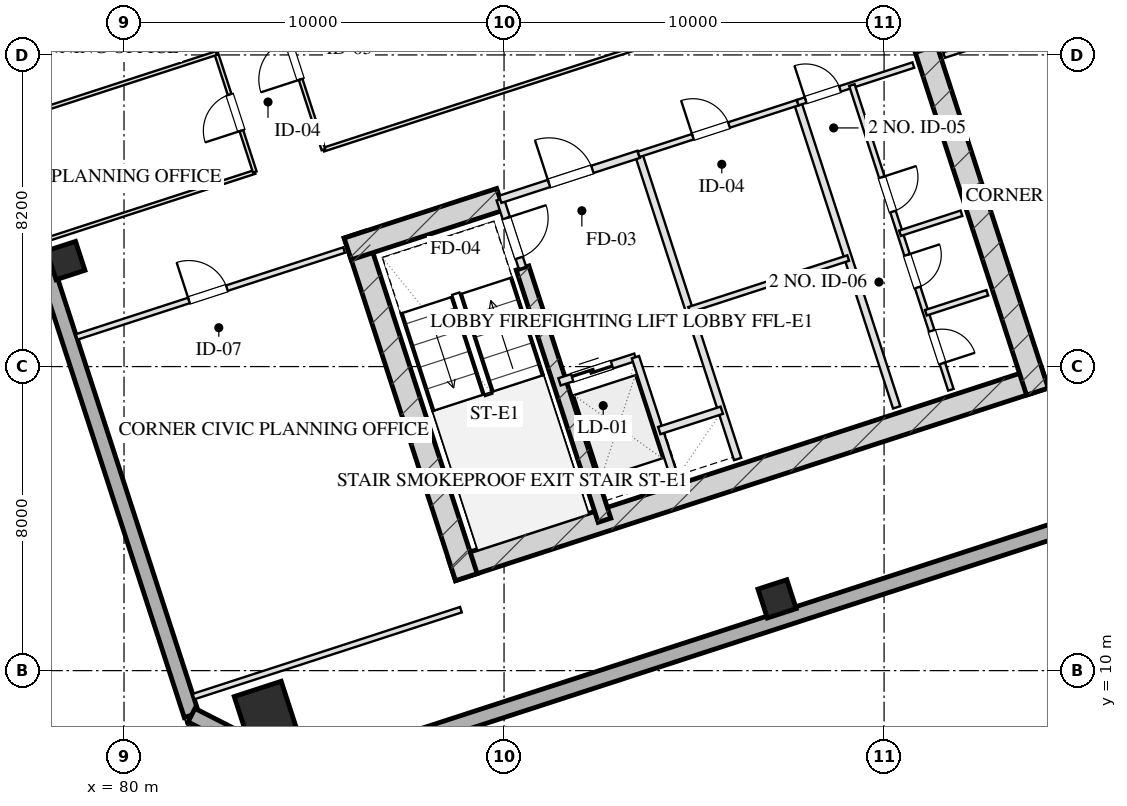
"""IFC4 building model, lengths in metres.
Left out: names, types, materials, properties, quantities, classifications, styles, units other than length and angle.
Written with IfcOpenShell. Run it as: python <this file> out.ifc"""

import sys

from ifc_helpers import new_model, si_unit, direction, frame, frame_2d, origin, origin_2d, place, context, subcontext, project, spatial, rectangle, hollow_rectangle, extrude, element, fill, save


model = new_model("IFC4")
c1 = context("Model", 3, precision=1e-05, world=origin(), true_north=direction((0.0, 1.0)))
c2 = subcontext(c1, "Body", "Model", "MODEL_VIEW")
j1 = project(units=[si_unit("LENGTHUNIT", "METRE"), si_unit("PLANEANGLEUNIT", "RADIAN")], contexts=[c1])
p1 = place(None, origin())
s1 = spatial("IfcSite", under=j1, at=p1, CompositionType="ELEMENT")
p2 = place(p1, origin())
s2 = spatial("IfcBuilding", under=s1, at=p2, CompositionType="ELEMENT")
p3 = place(p2, frame((0.0, 0.0, 149.5)))
s3 = spatial("IfcBuildingStorey", under=s2, at=p3, CompositionType="ELEMENT", Elevation=149.5)
p4 = place(p3, frame((88.63, 12.652, 0.0), z_axis=(0.0, 0.0, 1.0), x_axis=(0.95105714907, 0.309015046886, 0.0)))
e1 = element("IfcWall", 1, at=p4, inside=s3, PredefinedType="SHEAR", context=c2, shape_type="SweptSolid", body=[
    extrude(rectangle(XDim=16.4, YDim=0.6, at=frame_2d((8.2, 0.0))), origin(), (0.0, 0.0, 1.0), 3.45),
])
p5 = place(p3, frame((86.078, 21.475, 0.0), z_axis=(0.0, 0.0, 1.0), x_axis=(0.309017938678, -0.951056209472, 0.0)))
e2 = element("IfcWall", 2, at=p5, inside=s3, PredefinedType="SHEAR", context=c2, shape_type="SweptSolid", body=[
    extrude(rectangle(XDim=9.48, YDim=0.6, at=frame_2d((4.74, 0.0))), origin(), (0.0, 0.0, 1.0), 3.45),
])
p6 = place(p3, frame((101.105, 26.358, 0.0), z_axis=(0.0, 0.0, 1.0), x_axis=(0.309010370028, -0.95105866865, 0.0)))
e3 = element("IfcWall", 3, at=p6, inside=s3, PredefinedType="SHEAR", context=c2, shape_type="SweptSolid", body=[
    extrude(rectangle(XDim=9.48, YDim=0.6, at=frame_2d((4.74, 0.0))), origin(), (0.0, 0.0, 1.0), 3.45),
])
p7 = place(p3, frame((90.486, 20.594, 0.0), z_axis=(0.0, 0.0, 1.0), x_axis=(0.309020428229, -0.951055400562, 0.0)))
e4 = element("IfcWall", 4, at=p7, inside=s3, PredefinedType="SHEAR", context=c2, shape_type="SweptSolid", body=[
    extrude(rectangle(XDim=6.98, YDim=0.35, at=frame_2d((3.49, 0.0))), origin(), (0.0, 0.0, 1.0), 3.45),
])
p8 = place(p3, frame((85.886, 21.097, 0.0), z_axis=(0.0, 0.0, 1.0), x_axis=(0.951068073652, 0.308981422225, 0.0)))
e5 = element("IfcWall", 5, at=p8, inside=s3, PredefinedType="SHEAR", context=c2, shape_type="SweptSolid", body=[
    extrude(rectangle(XDim=4.22, YDim=0.6, at=frame_2d((2.11, 0.0))), origin(), (0.0, 0.0, 1.0), 3.45),
])
p9 = place(p3, frame((83.719, 8.901, 0.0), z_axis=(0.0, 0.0, 1.0), x_axis=(0.951056516295, 0.309016994375, 0.0)))
e6 = element("IfcColumn", 6, at=p9, inside=s3, PredefinedType="COLUMN", context=c2, shape_type="SweptSolid", body=[
    extrude(hollow_rectangle(XDim=1.3, YDim=1.3, WallThickness=0.045, at=origin_2d()), origin(), (0.0, 0.0, 1.0), 3.451),
])
for number, where, z_axis, x_axis in (
    (7, (78.468, 20.79, 0.0), (0.0, 0.0, 1.0), (0.951, 0.309, 0.0)),
    (8, (97.185, 11.888, 0.0), (0.0, 0.0, 1.0), (0.951, 0.309, 0.0)),
):
    element("IfcColumn", number, at=place(p3, frame(where, z_axis=z_axis, x_axis=x_axis)), inside=s3, PredefinedType="COLUMN", context=c2, shape_type="SweptSolid", body=[
        extrude(hollow_rectangle(XDim=0.8, YDim=0.8, WallThickness=0.028, at=origin_2d()), origin(), (0.0, 0.0, 1.0), 3.451),
    ])
p10 = place(p3, frame((81.776, 8.827, 0.0), z_axis=(0.0, 0.0, 1.0), x_axis=(-0.309014228706, 0.951057414911, 0.0)))
e9 = element("IfcWall", 9, at=p10, inside=s3, PredefinedType="SOLIDWALL", context=c2, shape_type="SweptSolid", body=[
    extrude(rectangle(XDim=42.8, YDim=0.4, at=frame_2d((21.4, 0.0))), origin(), (0.0, 0.0, 1.0), 2.61),
])
p11 = place(p3, frame((98.224, 59.173, 0.0), z_axis=(0.0, 0.0, 1.0), x_axis=(0.309014228706, -0.951057414911, 0.0)))
e10 = element("IfcWall", 10, at=p11, inside=s3, PredefinedType="SOLIDWALL", context=c2, shape_type="SweptSolid", body=[
    extrude(rectangle(XDim=42.8, YDim=0.4, at=frame_2d((21.4, 0.0))), origin(), (0.0, 0.0, 1.0), 2.61),
])
p12 = place(p11, frame((26.675, 0.0, 0.75)))
e11 = element("IfcOpeningElement", 11, at=p12, cuts=e10, PredefinedType="OPENING", context=c2, shape_type="SweptSolid", body=[
    extrude(rectangle(XDim=2.25, YDim=1.46, at=frame_2d((1.125, 0.73))), frame((0.0, 0.21, 0.0), z_axis=(0.0, -1.0, 0.0), x_axis=(1.0, 0.0, 0.0)), (0.0, 0.0, 1.0), 0.42),
])
p13 = place(p11, frame((13.875, 0.0, 0.75)))
e12 = element("IfcOpeningElement", 12, at=p13, cuts=e10, PredefinedType="OPENING", context=c2, shape_type="SweptSolid", body=[
    extrude(rectangle(XDim=2.25, YDim=1.46, at=frame_2d((1.125, 0.73))), frame((0.0, 0.21, 0.0), z_axis=(0.0, -1.0, 0.0), x_axis=(1.0, 0.0, 0.0)), (0.0, 0.0, 1.0), 0.42),
])
p14 = place(p3, frame((109.908, 15.444, 0.0), z_axis=(0.0, 0.0, 1.0), x_axis=(-0.951057580055, -0.30901372044, 0.0)))
e13 = element("IfcWall", 13, at=p14, inside=s3, PredefinedType="SOLIDWALL", context=c2, shape_type="SweptSolid", body=[
    extrude(rectangle(XDim=26.4, YDim=0.4, at=frame_2d((13.2, 0.0))), origin(), (0.0, 0.0, 1.0), 2.61),
])
p15 = place(p3, frame((84.801, 7.286, 0.0), z_axis=(0.0, 0.0, 1.0), x_axis=(-0.891020832027, 0.453962417932, 0.0)))
e14 = element("IfcWall", 14, at=p15, inside=s3, PredefinedType="SOLIDWALL", context=c2, shape_type="SweptSolid", body=[
    extrude(rectangle(XDim=3.394, YDim=0.4, at=frame_2d((1.697, 0.0))), origin(), (0.0, 0.0, 1.0), 2.61),
])
p16 = place(p3, frame((89.899, 22.401, 0.0), z_axis=(0.0, 0.0, 1.0), x_axis=(0.308932062672, -0.951084108086, 0.0)))
e15 = element("IfcWall", 15, at=p16, inside=s3, PredefinedType="PARTITIONING", context=c2, shape_type="SweptSolid", body=[
    extrude(rectangle(XDim=1.9, YDim=0.2, at=frame_2d((0.95, 0.0))), origin(), (0.0, 0.0, 1.0), 3.175),
])
p17 = place(p16, frame((0.52, 0.0, 0.0)))
e16 = element("IfcOpeningElement", 16, at=p17, cuts=e15, PredefinedType="OPENING", context=c2, shape_type="SweptSolid", body=[
    extrude(rectangle(XDim=1.1, YDim=2.05, at=frame_2d((0.55, 1.025))), frame((0.0, 0.11, 0.0), z_axis=(0.0, -1.0, 0.0), x_axis=(1.0, 0.0, 0.0)), (0.0, 0.0, 1.0), 0.22),
])
p18 = place(p3, frame((93.542, 23.585, 0.0), z_axis=(0.0, 0.0, 1.0), x_axis=(0.309042196757, -0.951048327176, 0.0)))
e17 = element("IfcWall", 17, at=p18, inside=s3, PredefinedType="PARTITIONING", context=c2, shape_type="SweptSolid", body=[
    extrude(rectangle(XDim=8.43, YDim=0.2, at=frame_2d((4.215, 0.0))), origin(), (0.0, 0.0, 1.0), 3.175),
])
p19 = place(p3, frame((89.899, 22.401, 0.0), z_axis=(0.0, 0.0, 1.0), x_axis=(0.951046716504, 0.309047153403, 0.0)))
e18 = element("IfcWall", 18, at=p19, inside=s3, PredefinedType="PARTITIONING", context=c2, shape_type="SweptSolid", body=[
    extrude(rectangle(XDim=3.83, YDim=0.2, at=frame_2d((1.915, 0.0))), origin(), (0.0, 0.0, 1.0), 3.175),
])
p20 = place(p19, frame((1.35, 0.0, 0.0)))
e19 = element("IfcOpeningElement", 19, at=p20, cuts=e18, PredefinedType="OPENING", context=c2, shape_type="SweptSolid", body=[
    extrude(rectangle(XDim=1.2, YDim=2.05, at=frame_2d((0.6, 1.025))), frame((0.0, 0.11, 0.0), z_axis=(0.0, -1.0, 0.0), x_axis=(1.0, 0.0, 0.0)), (0.0, 0.0, 1.0), 0.22),
])
p21 = place(p3, frame((91.46, 17.598, 0.0), z_axis=(0.0, 0.0, 1.0), x_axis=(0.951062257173, 0.308999325213, 0.0)))
e20 = element("IfcWall", 20, at=p21, inside=s3, PredefinedType="PARTITIONING", context=c2, shape_type="SweptSolid", body=[
    extrude(rectangle(XDim=2.1, YDim=0.2, at=frame_2d((1.05, 0.0))), origin(), (0.0, 0.0, 1.0), 3.175),
])
p22 = place(p21, frame((0.35, 0.0, 0.0)))
e21 = element("IfcOpeningElement", 21, at=p22, cuts=e20, PredefinedType="OPENING", context=c2, shape_type="SweptSolid", body=[
    extrude(rectangle(XDim=1.1, YDim=2.05, at=frame_2d((0.55, 1.025))), frame((0.0, 0.11, 0.0), z_axis=(0.0, -1.0, 0.0), x_axis=(1.0, 0.0, 0.0)), (0.0, 0.0, 1.0), 0.22),
])
p23 = place(p3, frame((93.457, 18.247, 0.0), z_axis=(0.0, 0.0, 1.0), x_axis=(0.3089935693, -0.951064127245, 0.0)))
e22 = element("IfcWall", 22, at=p23, inside=s3, PredefinedType="PARTITIONING", context=c2, shape_type="SweptSolid", body=[
    extrude(rectangle(XDim=3.7, YDim=0.2, at=frame_2d((1.85, 0.0))), origin(), (0.0, 0.0, 1.0), 3.175),
])
p24 = place(p3, frame((94.084, 16.317, 0.0), z_axis=(0.0, 0.0, 1.0), x_axis=(0.951041328149, 0.309063734775, 0.0)))
e23 = element("IfcWall", 23, at=p24, inside=s3, PredefinedType="PARTITIONING", context=c2, shape_type="SweptSolid", body=[
    extrude(rectangle(XDim=1.73, YDim=0.2, at=frame_2d((0.865, 0.0))), origin(), (0.0, 0.0, 1.0), 3.175),
])
p25 = place(p3, frame((97.727, 24.944, 0.0), z_axis=(0.0, 0.0, 1.0), x_axis=(0.309016001439, -0.951056838919, 0.0)))
e24 = element("IfcWall", 24, at=p25, inside=s3, PredefinedType="PARTITIONING", context=c2, shape_type="SweptSolid", body=[
    extrude(rectangle(XDim=8.43, YDim=0.2, at=frame_2d((4.215, 0.0))), origin(), (0.0, 0.0, 1.0), 3.175),
])
p26 = place(p3, frame((93.542, 23.585, 0.0), z_axis=(0.0, 0.0, 1.0), x_axis=(0.951063829732, 0.308994485023, 0.0)))
e25 = element("IfcWall", 25, at=p26, inside=s3, PredefinedType="PARTITIONING", context=c2, shape_type="SweptSolid", body=[
    extrude(rectangle(XDim=4.4, YDim=0.15, at=frame_2d((2.2, 0.0))), origin(), (0.0, 0.0, 1.0), 3.175),
])
p27 = place(p26, frame((1.5, 0.0, 0.0)))
e26 = element("IfcOpeningElement", 26, at=p27, cuts=e25, PredefinedType="OPENING", context=c2, shape_type="SweptSolid", body=[
    extrude(rectangle(XDim=1.0, YDim=2.05, at=frame_2d((0.5, 1.025))), frame((0.0, 0.085, 0.0), z_axis=(0.0, -1.0, 0.0), x_axis=(1.0, 0.0, 0.0)), (0.0, 0.0, 1.0), 0.17),
])
p28 = place(p3, frame((94.871, 19.495, 0.0), z_axis=(0.0, 0.0, 1.0), x_axis=(0.951042223598, 0.309060979314, 0.0)))
e27 = element("IfcWall", 27, at=p28, inside=s3, PredefinedType="PARTITIONING", context=c2, shape_type="SweptSolid", body=[
    extrude(rectangle(XDim=4.4, YDim=0.15, at=frame_2d((2.2, 0.0))), origin(), (0.0, 0.0, 1.0), 3.175),
])
p29 = place(p3, frame((97.727, 24.944, 0.0), z_axis=(0.0, 0.0, 1.0), x_axis=(0.951036872128, 0.309077446369, 0.0)))
e28 = element("IfcWall", 28, at=p29, inside=s3, PredefinedType="PARTITIONING", context=c2, shape_type="SweptSolid", body=[
    extrude(rectangle(XDim=3.2, YDim=0.15, at=frame_2d((1.6, 0.0))), origin(), (0.0, 0.0, 1.0), 3.175),
])
p30 = place(p29, frame((0.22, 0.0, 0.0)))
e29 = element("IfcOpeningElement", 29, at=p30, cuts=e28, PredefinedType="OPENING", context=c2, shape_type="SweptSolid", body=[
    extrude(rectangle(XDim=0.95, YDim=2.05, at=frame_2d((0.475, 1.025))), frame((0.0, 0.085, 0.0), z_axis=(0.0, -1.0, 0.0), x_axis=(1.0, 0.0, 0.0)), (0.0, 0.0, 1.0), 0.17),
])
p31 = place(p3, frame((99.153, 25.408, 0.0), z_axis=(0.0, 0.0, 1.0), x_axis=(0.309016001439, -0.951056838919, 0.0)))
e30 = element("IfcWall", 30, at=p31, inside=s3, PredefinedType="PARTITIONING", context=c2, shape_type="SweptSolid", body=[
    extrude(rectangle(XDim=8.43, YDim=0.15, at=frame_2d((4.215, 0.0))), origin(), (0.0, 0.0, 1.0), 3.175),
])
p32 = place(p31, frame((2.55, 0.0, 0.0)))
e31 = element("IfcOpeningElement", 31, at=p32, cuts=e30, PredefinedType="OPENING", context=c2, shape_type="SweptSolid", body=[
    extrude(rectangle(XDim=0.95, YDim=2.05, at=frame_2d((0.475, 1.025))), frame((0.0, 0.085, 0.0), z_axis=(0.0, -1.0, 0.0), x_axis=(1.0, 0.0, 0.0)), (0.0, 0.0, 1.0), 0.17),
])
p33 = place(p31, frame((4.7, 0.0, 0.0)))
e32 = element("IfcOpeningElement", 32, at=p33, cuts=e30, PredefinedType="OPENING", context=c2, shape_type="SweptSolid", body=[
    extrude(rectangle(XDim=0.9, YDim=2.05, at=frame_2d((0.45, 1.025))), frame((0.0, 0.085, 0.0), z_axis=(0.0, -1.0, 0.0), x_axis=(1.0, 0.0, 0.0)), (0.0, 0.0, 1.0), 0.17),
])
p34 = place(p31, frame((6.8, 0.0, 0.0)))
e33 = element("IfcOpeningElement", 33, at=p34, cuts=e30, PredefinedType="OPENING", context=c2, shape_type="SweptSolid", body=[
    extrude(rectangle(XDim=0.9, YDim=2.05, at=frame_2d((0.45, 1.025))), frame((0.0, 0.085, 0.0), z_axis=(0.0, -1.0, 0.0), x_axis=(1.0, 0.0, 0.0)), (0.0, 0.0, 1.0), 0.17),
])
p35 = place(p3, frame((100.42, 21.509, 0.0), z_axis=(0.0, 0.0, 1.0), x_axis=(0.951040401051, 0.309066587596, 0.0)))
e34 = element("IfcWall", 34, at=p35, inside=s3, PredefinedType="PARTITIONING", context=c2, shape_type="SweptSolid", body=[
    extrude(rectangle(XDim=1.7, YDim=0.15, at=frame_2d((0.85, 0.0))), origin(), (0.0, 0.0, 1.0), 3.175),
])
p36 = place(p3, frame((101.1, 19.416, 0.0), z_axis=(0.0, 0.0, 1.0), x_axis=(0.951054116971, 0.309024378638, 0.0)))
e35 = element("IfcWall", 35, at=p36, inside=s3, PredefinedType="PARTITIONING", context=c2, shape_type="SweptSolid", body=[
    extrude(rectangle(XDim=1.7, YDim=0.15, at=frame_2d((0.85, 0.0))), origin(), (0.0, 0.0, 1.0), 3.175),
])
p37 = place(p3, frame((81.828, 9.316, 0.0), z_axis=(0.0, 0.0, 1.0), x_axis=(0.95105128112, 0.309033106124, 0.0)))
e36 = element("IfcWall", 36, at=p37, inside=s3, PredefinedType="PARTITIONING", context=c2, shape_type="SweptSolid", body=[
    extrude(rectangle(XDim=7.4, YDim=0.15, at=frame_2d((3.7, 0.0))), origin(), (0.0, 0.0, 1.0), 3.175),
])
p38 = place(p3, frame((78.753, 18.78, 0.0), z_axis=(0.0, 0.0, 1.0), x_axis=(0.951060977215, 0.309003264738, 0.0)))
e37 = element("IfcWall", 37, at=p38, inside=s3, PredefinedType="PARTITIONING", context=c2, shape_type="SweptSolid", body=[
    extrude(rectangle(XDim=7.4, YDim=0.15, at=frame_2d((3.7, 0.0))), origin(), (0.0, 0.0, 1.0), 3.175),
])
p39 = place(p38, frame((3.108, 0.0, 0.0)))
e38 = element("IfcOpeningElement", 38, at=p39, cuts=e37, PredefinedType="OPENING", context=c2, shape_type="SweptSolid", body=[
    extrude(rectangle(XDim=1.05, YDim=2.05, at=frame_2d((0.525, 1.025))), frame((0.0, 0.085, 0.0), z_axis=(0.0, -1.0, 0.0), x_axis=(1.0, 0.0, 0.0)), (0.0, 0.0, 1.0), 0.17),
])
p40 = place(p3, frame((101.578, 26.196, 0.0), z_axis=(0.0, 0.0, 1.0), x_axis=(0.951064934653, 0.308991084134, 0.0)))
e39 = element("IfcWall", 39, at=p40, inside=s3, PredefinedType="PARTITIONING", context=c2, shape_type="SweptSolid", body=[
    extrude(rectangle(XDim=6.8, YDim=0.15, at=frame_2d((3.4, 0.0))), origin(), (0.0, 0.0, 1.0), 3.175),
])
p41 = place(p40, frame((2.856, 0.0, 0.0)))
e40 = element("IfcOpeningElement", 40, at=p41, cuts=e39, PredefinedType="OPENING", context=c2, shape_type="SweptSolid", body=[
    extrude(rectangle(XDim=0.85, YDim=2.05, at=frame_2d((0.425, 1.025))), frame((0.0, 0.085, 0.0), z_axis=(0.0, -1.0, 0.0), x_axis=(1.0, 0.0, 0.0)), (0.0, 0.0, 1.0), 0.17),
])
p42 = place(p3, frame((77.925, 21.328, 0.0), z_axis=(0.0, 0.0, 1.0), x_axis=(0.951059431056, 0.309008023519, 0.0)))
e41 = element("IfcWall", 41, at=p42, inside=s3, PredefinedType="MOVABLE", context=c2, shape_type="SweptSolid", body=[
    extrude(rectangle(XDim=5.8, YDim=0.1, at=frame_2d((2.9, 0.0))), origin(), (0.0, 0.0, 1.0), 3.175),
])
p43 = place(p3, frame((85.248, 23.708, 0.0), z_axis=(0.0, 0.0, 1.0), x_axis=(0.951059123431, 0.309008970321, 0.0)))
e42 = element("IfcWall", 42, at=p43, inside=s3, PredefinedType="MOVABLE", context=c2, shape_type="SweptSolid", body=[
    extrude(rectangle(XDim=8.95, YDim=0.1, at=frame_2d((4.475, 0.0))), origin(), (0.0, 0.0, 1.0), 3.175),
])
p44 = place(p3, frame((83.441, 23.121, 0.0), z_axis=(0.0, 0.0, 1.0), x_axis=(-0.30901773025, 0.951056277195, 0.0)))
e43 = element("IfcWall", 43, at=p44, inside=s3, PredefinedType="MOVABLE", context=c2, shape_type="SweptSolid", body=[
    extrude(rectangle(XDim=16.64, YDim=0.1, at=frame_2d((8.32, 0.0))), origin(), (0.0, 0.0, 1.0), 3.175),
])
p45 = place(p44, frame((1.143, 0.0, 0.0)))
e44 = element("IfcOpeningElement", 44, at=p45, cuts=e43, PredefinedType="OPENING", context=c2, shape_type="SweptSolid", body=[
    extrude(rectangle(XDim=1.0, YDim=2.05, at=frame_2d((0.5, 1.025))), frame((0.0, 0.06, 0.0), z_axis=(0.0, -1.0, 0.0), x_axis=(1.0, 0.0, 0.0)), (0.0, 0.0, 1.0), 0.12),
])
p46 = place(p44, frame((4.703, 0.0, 0.0)))
e45 = element("IfcOpeningElement", 45, at=p46, cuts=e43, PredefinedType="OPENING", context=c2, shape_type="SweptSolid", body=[
    extrude(rectangle(XDim=1.0, YDim=2.05, at=frame_2d((0.5, 1.025))), frame((0.0, 0.06, 0.0), z_axis=(0.0, -1.0, 0.0), x_axis=(1.0, 0.0, 0.0)), (0.0, 0.0, 1.0), 0.12),
])
p47 = place(p44, frame((7.82, 0.0, 0.0)))
e46 = element("IfcOpeningElement", 46, at=p47, cuts=e43, PredefinedType="OPENING", context=c2, shape_type="SweptSolid", body=[
    extrude(rectangle(XDim=1.0, YDim=2.05, at=frame_2d((0.5, 1.025))), frame((0.0, 0.06, 0.0), z_axis=(0.0, -1.0, 0.0), x_axis=(1.0, 0.0, 0.0)), (0.0, 0.0, 1.0), 0.12),
])
p48 = place(p44, frame((10.92, 0.0, 0.0)))
e47 = element("IfcOpeningElement", 47, at=p48, cuts=e43, PredefinedType="OPENING", context=c2, shape_type="SweptSolid", body=[
    extrude(rectangle(XDim=1.05, YDim=2.05, at=frame_2d((0.525, 1.025))), frame((0.0, 0.06, 0.0), z_axis=(0.0, -1.0, 0.0), x_axis=(1.0, 0.0, 0.0)), (0.0, 0.0, 1.0), 0.12),
])
p49 = place(p44, frame((14.48, 0.0, 0.0)))
e48 = element("IfcOpeningElement", 48, at=p49, cuts=e43, PredefinedType="OPENING", context=c2, shape_type="SweptSolid", body=[
    extrude(rectangle(XDim=1.0, YDim=2.05, at=frame_2d((0.5, 1.025))), frame((0.0, 0.06, 0.0), z_axis=(0.0, -1.0, 0.0), x_axis=(1.0, 0.0, 0.0)), (0.0, 0.0, 1.0), 0.12),
])
p50 = place(p3, frame((85.248, 23.708, 0.0), z_axis=(0.0, 0.0, 1.0), x_axis=(-0.309004459387, 0.951060589068, 0.0)))
e49 = element("IfcWall", 49, at=p50, inside=s3, PredefinedType="MOVABLE", context=c2, shape_type="SweptSolid", body=[
    extrude(rectangle(XDim=16.64, YDim=0.1, at=frame_2d((8.32, 0.0))), origin(), (0.0, 0.0, 1.0), 3.175),
])
p51 = place(p50, frame((1.944, 0.0, 0.0)))
e50 = element("IfcOpeningElement", 50, at=p51, cuts=e49, PredefinedType="OPENING", context=c2, shape_type="SweptSolid", body=[
    extrude(rectangle(XDim=1.1, YDim=2.05, at=frame_2d((0.55, 1.025))), frame((0.0, 0.06, 0.0), z_axis=(0.0, -1.0, 0.0), x_axis=(1.0, 0.0, 0.0)), (0.0, 0.0, 1.0), 0.12),
])
p52 = place(p50, frame((14.264, 0.0, 0.0)))
e51 = element("IfcOpeningElement", 51, at=p52, cuts=e49, PredefinedType="OPENING", context=c2, shape_type="SweptSolid", body=[
    extrude(rectangle(XDim=1.1, YDim=2.05, at=frame_2d((0.55, 1.025))), frame((0.0, 0.06, 0.0), z_axis=(0.0, -1.0, 0.0), x_axis=(1.0, 0.0, 0.0)), (0.0, 0.0, 1.0), 0.12),
])
p53 = place(p3, frame((76.909, 24.454, 0.0), z_axis=(0.0, 0.0, 1.0), x_axis=(0.951059431056, 0.309008023519, 0.0)))
e52 = element("IfcWall", 52, at=p53, inside=s3, PredefinedType="MOVABLE", context=c2, shape_type="SweptSolid", body=[
    extrude(rectangle(XDim=5.8, YDim=0.1, at=frame_2d((2.9, 0.0))), origin(), (0.0, 0.0, 1.0), 3.175),
])
p54 = place(p17, origin())
e53 = element("IfcDoor", 53, at=p54, inside=s3, OperationType="SINGLE_SWING_LEFT", PredefinedType="DOOR", context=c2, shape_type="SweptSolid", body=[
    extrude(rectangle(XDim=1.1, YDim=2.05, at=frame_2d((0.55, 1.025))), frame((0.0, 0.025, 0.0), z_axis=(0.0, -1.0, 0.0), x_axis=(1.0, 0.0, 0.0)), (0.0, 0.0, 1.0), 0.05),
])
fill(e16, e53)
p55 = place(p20, origin())
e54 = element("IfcDoor", 54, at=p55, inside=s3, OperationType="SINGLE_SWING_LEFT", PredefinedType="DOOR", context=c2, shape_type="SweptSolid", body=[
    extrude(rectangle(XDim=1.2, YDim=2.05, at=frame_2d((0.6, 1.025))), frame((0.0, 0.025, 0.0), z_axis=(0.0, -1.0, 0.0), x_axis=(1.0, 0.0, 0.0)), (0.0, 0.0, 1.0), 0.05),
])
fill(e19, e54)
p56 = place(p22, origin())
e55 = element("IfcDoor", 55, at=p56, inside=s3, OperationType="DOUBLE_DOOR_SLIDING", PredefinedType="DOOR", context=c2, shape_type="SweptSolid", body=[
    extrude(rectangle(XDim=1.1, YDim=2.05, at=frame_2d((0.55, 1.025))), frame((0.0, 0.025, 0.0), z_axis=(0.0, -1.0, 0.0), x_axis=(1.0, 0.0, 0.0)), (0.0, 0.0, 1.0), 0.05),
])
fill(e21, e55)
p57 = place(p27, origin())
e56 = element("IfcDoor", 56, at=p57, inside=s3, OperationType="SINGLE_SWING_LEFT", PredefinedType="DOOR", context=c2, shape_type="SweptSolid", body=[
    extrude(rectangle(XDim=1.0, YDim=2.05, at=frame_2d((0.5, 1.025))), frame((0.0, 0.025, 0.0), z_axis=(0.0, -1.0, 0.0), x_axis=(1.0, 0.0, 0.0)), (0.0, 0.0, 1.0), 0.05),
])
fill(e26, e56)
p58 = place(p30, origin())
e57 = element("IfcDoor", 57, at=p58, inside=s3, OperationType="SINGLE_SWING_LEFT", PredefinedType="DOOR", context=c2, shape_type="SweptSolid", body=[
    extrude(rectangle(XDim=0.95, YDim=2.05, at=frame_2d((0.475, 1.025))), frame((0.0, 0.025, 0.0), z_axis=(0.0, -1.0, 0.0), x_axis=(1.0, 0.0, 0.0)), (0.0, 0.0, 1.0), 0.05),
])
fill(e29, e57)
p59 = place(p32, origin())
e58 = element("IfcDoor", 58, at=p59, inside=s3, OperationType="SINGLE_SWING_LEFT", PredefinedType="DOOR", context=c2, shape_type="SweptSolid", body=[
    extrude(rectangle(XDim=0.95, YDim=2.05, at=frame_2d((0.475, 1.025))), frame((0.0, 0.025, 0.0), z_axis=(0.0, -1.0, 0.0), x_axis=(1.0, 0.0, 0.0)), (0.0, 0.0, 1.0), 0.05),
])
fill(e31, e58)
p60 = place(p33, origin())
e59 = element("IfcDoor", 59, at=p60, inside=s3, OperationType="SINGLE_SWING_LEFT", PredefinedType="DOOR", context=c2, shape_type="SweptSolid", body=[
    extrude(rectangle(XDim=0.9, YDim=2.05, at=frame_2d((0.45, 1.025))), frame((0.0, 0.025, 0.0), z_axis=(0.0, -1.0, 0.0), x_axis=(1.0, 0.0, 0.0)), (0.0, 0.0, 1.0), 0.05),
])
fill(e32, e59)
p61 = place(p34, origin())
e60 = element("IfcDoor", 60, at=p61, inside=s3, OperationType="SINGLE_SWING_RIGHT", PredefinedType="DOOR", context=c2, shape_type="SweptSolid", body=[
    extrude(rectangle(XDim=0.9, YDim=2.05, at=frame_2d((0.45, 1.025))), frame((0.0, 0.025, 0.0), z_axis=(0.0, -1.0, 0.0), x_axis=(1.0, 0.0, 0.0)), (0.0, 0.0, 1.0), 0.05),
])
fill(e33, e60)
p62 = place(p39, origin())
e61 = element("IfcDoor", 61, at=p62, inside=s3, OperationType="SINGLE_SWING_LEFT", PredefinedType="DOOR", context=c2, shape_type="SweptSolid", body=[
    extrude(rectangle(XDim=1.05, YDim=2.05, at=frame_2d((0.525, 1.025))), frame((0.0, 0.025, 0.0), z_axis=(0.0, -1.0, 0.0), x_axis=(1.0, 0.0, 0.0)), (0.0, 0.0, 1.0), 0.05),
])
fill(e38, e61)
p63 = place(p45, origin())
e62 = element("IfcDoor", 62, at=p63, inside=s3, OperationType="SINGLE_SWING_LEFT", PredefinedType="DOOR", context=c2, shape_type="SweptSolid", body=[
    extrude(rectangle(XDim=1.0, YDim=2.05, at=frame_2d((0.5, 1.025))), frame((0.0, 0.025, 0.0), z_axis=(0.0, -1.0, 0.0), x_axis=(1.0, 0.0, 0.0)), (0.0, 0.0, 1.0), 0.05),
])
fill(e44, e62)
p64 = place(p51, origin())
e63 = element("IfcDoor", 63, at=p64, inside=s3, OperationType="SINGLE_SWING_LEFT", PredefinedType="DOOR", context=c2, shape_type="SweptSolid", body=[
    extrude(rectangle(XDim=1.1, YDim=2.05, at=frame_2d((0.55, 1.025))), frame((0.0, 0.025, 0.0), z_axis=(0.0, -1.0, 0.0), x_axis=(1.0, 0.0, 0.0)), (0.0, 0.0, 1.0), 0.05),
])
fill(e50, e63)
save(model, sys.argv[1])
